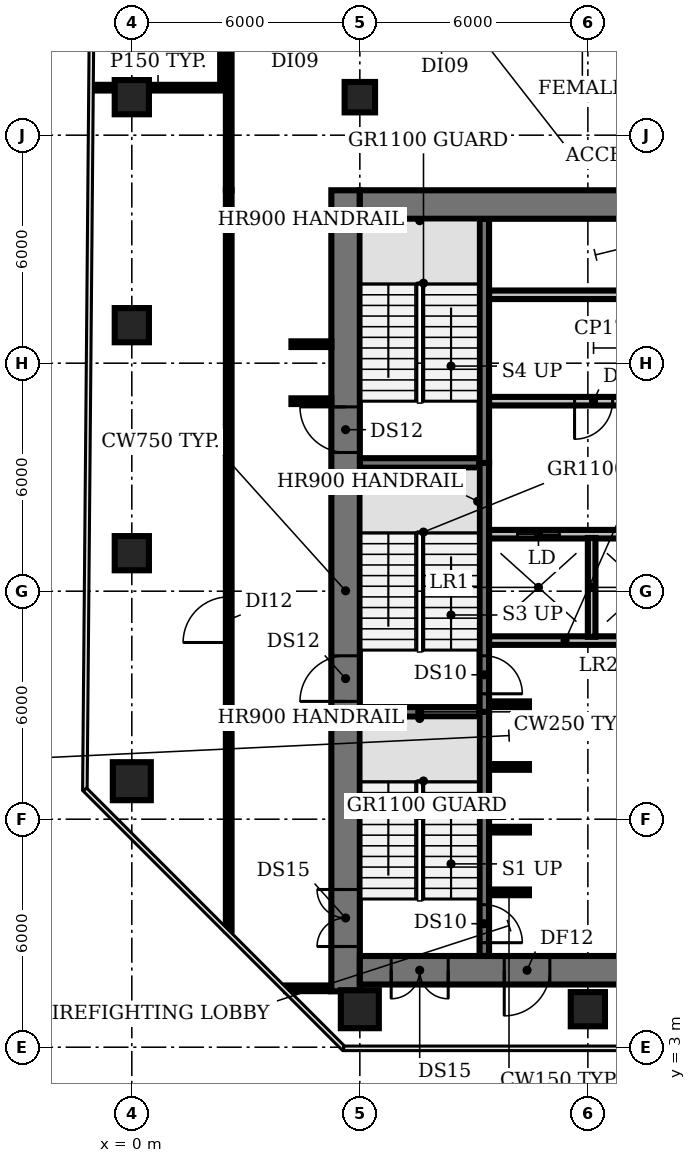
"""IFC4 building model, lengths in metres.
Left out: names, types, materials, properties, quantities, classifications, styles, units other than length and angle.
Written with IfcOpenShell. Run it as: python <this file> out.ifc"""

import sys

from ifc_helpers import new_model, si_unit, direction, frame, frame_2d, origin, origin_2d, place, context, subcontext, project, spatial, rectangle, circle, extrude, element, fill, save


model = new_model("IFC4")
c1 = context("Model", 3, precision=1e-05, world=origin(), true_north=direction((0.0, 1.0)))
c2 = subcontext(c1, "Body", "Model", "MODEL_VIEW")
j1 = project(units=[si_unit("LENGTHUNIT", "METRE"), si_unit("PLANEANGLEUNIT", "RADIAN")], contexts=[c1])
p1 = place(None, origin())
s1 = spatial("IfcSite", under=j1, at=p1, CompositionType="ELEMENT")
p2 = place(p1, origin())
s2 = spatial("IfcBuilding", under=s1, at=p2, CompositionType="ELEMENT")
p3 = place(p2, frame((0.0, 0.0, 113.0)))
s3 = spatial("IfcBuildingStorey", under=s2, at=p3, CompositionType="ELEMENT", Elevation=113.0)
p4 = place(p3, frame((0.0, 10.0, 0.0), z_axis=(0.0, 0.0, 1.0), x_axis=(1.0, 0.0, 0.0)))
e1 = element("IfcColumn", 1, at=p4, inside=s3, PredefinedType="COLUMN", context=c2, shape_type="SweptSolid", body=[
    extrude(circle(Radius=0.5, at=origin_2d()), origin(), (0.0, 0.0, 1.0), 3.85),
])
for number, where, z_axis, x_axis in (
    (2, (0.0, 16.0, 0.0), (0.0, 0.0, 1.0), (1.0, 0.0, 0.0)),
    (3, (0.0, 22.0, 0.0), (0.0, 0.0, 1.0), (1.0, 0.0, 0.0)),
    (4, (0.0, 28.0, 0.0), (0.0, 0.0, 1.0), (1.0, 0.0, 0.0)),
):
    element("IfcColumn", number, at=place(p3, frame(where, z_axis=z_axis, x_axis=x_axis)), inside=s3, PredefinedType="COLUMN", context=c2, shape_type="SweptSolid", body=[
        extrude(rectangle(XDim=0.9, YDim=0.9, at=origin_2d()), origin(), (0.0, 0.0, 1.0), 3.85),
    ])
p5 = place(p3, frame((6.0, 4.0, 0.0), z_axis=(0.0, 0.0, 1.0), x_axis=(1.0, 0.0, 0.0)))
e5 = element("IfcColumn", 5, at=p5, inside=s3, PredefinedType="COLUMN", context=c2, shape_type="SweptSolid", body=[
    extrude(circle(Radius=0.5, at=origin_2d()), origin(), (0.0, 0.0, 1.0), 3.85),
])
p6 = place(p3, frame((6.0, 28.0, 0.0), z_axis=(0.0, 0.0, 1.0), x_axis=(1.0, 0.0, 0.0)))
e6 = element("IfcColumn", 6, at=p6, inside=s3, PredefinedType="COLUMN", context=c2, shape_type="SweptSolid", body=[
    extrude(rectangle(XDim=0.8, YDim=0.8, at=origin_2d()), origin(), (0.0, 0.0, 1.0), 3.85),
])
p7 = place(p3, frame((12.0, 4.0, 0.0), z_axis=(0.0, 0.0, 1.0), x_axis=(1.0, 0.0, 0.0)))
e7 = element("IfcColumn", 7, at=p7, inside=s3, PredefinedType="COLUMN", context=c2, shape_type="SweptSolid", body=[
    extrude(rectangle(XDim=0.9, YDim=0.9, at=origin_2d()), origin(), (0.0, 0.0, 1.0), 3.85),
])
for number, where, z_axis, x_axis in (
    (8, (9.4, 7.075, 0.0), (0.0, 0.0, 1.0), (1.0, 0.0, 0.0)),
    (9, (9.4, 8.725, 0.0), (0.0, 0.0, 1.0), (1.0, 0.0, 0.0)),
    (10, (9.4, 10.375, 0.0), (0.0, 0.0, 1.0), (1.0, 0.0, 0.0)),
):
    element("IfcWall", number, at=place(p3, frame(where, z_axis=z_axis, x_axis=x_axis)), inside=s3, PredefinedType="SHEAR", context=c2, shape_type="SweptSolid", body=[
        extrude(rectangle(XDim=1.05, YDim=0.15, at=frame_2d((0.525, 0.0))), origin(), (0.0, 0.0, 1.0), 3.85),
    ])
p8 = place(p3, frame((6.0, 11.825, 0.0), z_axis=(0.0, 0.0, 1.0), x_axis=(1.0, 0.0, 0.0)))
e11 = element("IfcWall", 11, at=p8, inside=s3, PredefinedType="SHEAR", context=c2, shape_type="SweptSolid", body=[
    extrude(rectangle(XDim=3.15, YDim=0.25, at=frame_2d((1.575, 0.0))), origin(), (0.0, 0.0, 1.0), 3.85),
])
p9 = place(p3, frame((9.4, 12.025, 0.0), z_axis=(0.0, 0.0, 1.0), x_axis=(1.0, 0.0, 0.0)))
e12 = element("IfcWall", 12, at=p9, inside=s3, PredefinedType="SHEAR", context=c2, shape_type="SweptSolid", body=[
    extrude(rectangle(XDim=1.05, YDim=0.15, at=frame_2d((0.525, 0.0))), origin(), (0.0, 0.0, 1.0), 3.85),
])
p10 = place(p3, frame((9.4, 13.7, 0.0), z_axis=(0.0, 0.0, 1.0), x_axis=(1.0, 0.0, 0.0)))
e13 = element("IfcWall", 13, at=p10, inside=s3, PredefinedType="PARTITIONING", context=c2, shape_type="SweptSolid", body=[
    extrude(rectangle(XDim=4.0, YDim=0.225, at=frame_2d((2.0, 0.0))), origin(), (0.0, 0.0, 1.0), 3.85),
])
p11 = place(p3, frame((9.4, 16.5, 0.0), z_axis=(0.0, 0.0, 1.0), x_axis=(1.0, 0.0, 0.0)))
e14 = element("IfcWall", 14, at=p11, inside=s3, PredefinedType="PARTITIONING", context=c2, shape_type="SweptSolid", body=[
    extrude(rectangle(XDim=14.6, YDim=0.225, at=frame_2d((7.3, 0.0))), origin(), (0.0, 0.0, 1.0), 3.85),
])
p12 = place(p11, frame((0.75, 0.0, 0.0)))
e15 = element("IfcOpeningElement", 15, at=p12, cuts=e14, PredefinedType="OPENING", context=c2, shape_type="SweptSolid", body=[
    extrude(rectangle(XDim=1.1, YDim=2.1, at=frame_2d((0.55, 1.05))), frame((0.0, 0.123, 0.0), z_axis=(0.0, -1.0, 0.0), x_axis=(1.0, 0.0, 0.0)), (0.0, 0.0, 1.0), 0.245),
])
p13 = place(p11, frame((3.55, 0.0, 0.0)))
e16 = element("IfcOpeningElement", 16, at=p13, cuts=e14, PredefinedType="OPENING", context=c2, shape_type="SweptSolid", body=[
    extrude(rectangle(XDim=1.1, YDim=2.1, at=frame_2d((0.55, 1.05))), frame((0.0, 0.123, 0.0), z_axis=(0.0, -1.0, 0.0), x_axis=(1.0, 0.0, 0.0)), (0.0, 0.0, 1.0), 0.245),
])
p14 = place(p11, frame((6.35, 0.0, 0.0)))
e17 = element("IfcOpeningElement", 17, at=p14, cuts=e14, PredefinedType="OPENING", context=c2, shape_type="SweptSolid", body=[
    extrude(rectangle(XDim=1.1, YDim=2.1, at=frame_2d((0.55, 1.05))), frame((0.0, 0.123, 0.0), z_axis=(0.0, -1.0, 0.0), x_axis=(1.0, 0.0, 0.0)), (0.0, 0.0, 1.0), 0.245),
])
p15 = place(p11, frame((9.15, 0.0, 0.0)))
e18 = element("IfcOpeningElement", 18, at=p15, cuts=e14, PredefinedType="OPENING", context=c2, shape_type="SweptSolid", body=[
    extrude(rectangle(XDim=1.1, YDim=2.1, at=frame_2d((0.55, 1.05))), frame((0.0, 0.123, 0.0), z_axis=(0.0, -1.0, 0.0), x_axis=(1.0, 0.0, 0.0)), (0.0, 0.0, 1.0), 0.245),
])
p16 = place(p11, frame((11.308, 0.0, 0.0)))
e19 = element("IfcOpeningElement", 19, at=p16, cuts=e14, PredefinedType="OPENING", context=c2, shape_type="SweptSolid", body=[
    extrude(rectangle(XDim=0.9, YDim=2.1, at=frame_2d((0.45, 1.05))), frame((0.0, 0.123, 0.0), z_axis=(0.0, -1.0, 0.0), x_axis=(1.0, 0.0, 0.0)), (0.0, 0.0, 1.0), 0.245),
])
p17 = place(p11, frame((13.083, 0.0, 0.0)))
e20 = element("IfcOpeningElement", 20, at=p17, cuts=e14, PredefinedType="OPENING", context=c2, shape_type="SweptSolid", body=[
    extrude(rectangle(XDim=0.9, YDim=2.1, at=frame_2d((0.45, 1.05))), frame((0.0, 0.123, 0.0), z_axis=(0.0, -1.0, 0.0), x_axis=(1.0, 0.0, 0.0)), (0.0, 0.0, 1.0), 0.245),
])
p18 = place(p3, frame((6.0, 18.375, 0.0), z_axis=(0.0, 0.0, 1.0), x_axis=(1.0, 0.0, 0.0)))
e21 = element("IfcWall", 21, at=p18, inside=s3, PredefinedType="SHEAR", context=c2, shape_type="SweptSolid", body=[
    extrude(rectangle(XDim=3.15, YDim=0.25, at=frame_2d((1.575, 0.0))), origin(), (0.0, 0.0, 1.0), 3.85),
])
p19 = place(p3, frame((24.0, 20.0, 0.0), z_axis=(0.0, 0.0, 1.0), x_axis=(-1.0, 0.0, 0.0)))
e22 = element("IfcWall", 22, at=p19, inside=s3, PredefinedType="PARTITIONING", context=c2, shape_type="SweptSolid", body=[
    extrude(rectangle(XDim=14.6, YDim=0.225, at=frame_2d((7.3, 0.0))), origin(), (0.0, 0.0, 1.0), 3.85),
])
p20 = place(p19, frame((11.35, 0.0, 0.0)))
e23 = element("IfcOpeningElement", 23, at=p20, cuts=e22, PredefinedType="OPENING", context=c2, shape_type="SweptSolid", body=[
    extrude(rectangle(XDim=1.0, YDim=2.1, at=frame_2d((0.5, 1.05))), frame((0.0, 0.123, 0.0), z_axis=(0.0, -1.0, 0.0), x_axis=(1.0, 0.0, 0.0)), (0.0, 0.0, 1.0), 0.245),
])
p21 = place(p19, frame((5.775, 0.0, 0.0)))
e24 = element("IfcOpeningElement", 24, at=p21, cuts=e22, PredefinedType="OPENING", context=c2, shape_type="SweptSolid", body=[
    extrude(rectangle(XDim=1.0, YDim=2.1, at=frame_2d((0.5, 1.05))), frame((0.0, 0.123, 0.0), z_axis=(0.0, -1.0, 0.0), x_axis=(1.0, 0.0, 0.0)), (0.0, 0.0, 1.0), 0.245),
])
p22 = place(p19, frame((2.308, 0.0, 0.0)))
e25 = element("IfcOpeningElement", 25, at=p22, cuts=e22, PredefinedType="OPENING", context=c2, shape_type="SweptSolid", body=[
    extrude(rectangle(XDim=0.9, YDim=2.1, at=frame_2d((0.45, 1.05))), frame((0.0, 0.123, 0.0), z_axis=(0.0, -1.0, 0.0), x_axis=(1.0, 0.0, 0.0)), (0.0, 0.0, 1.0), 0.245),
])
p23 = place(p19, frame((0.532, 0.0, 0.0)))
e26 = element("IfcOpeningElement", 26, at=p23, cuts=e22, PredefinedType="OPENING", context=c2, shape_type="SweptSolid", body=[
    extrude(rectangle(XDim=0.9, YDim=2.1, at=frame_2d((0.45, 1.05))), frame((0.0, 0.123, 0.0), z_axis=(0.0, -1.0, 0.0), x_axis=(1.0, 0.0, 0.0)), (0.0, 0.0, 1.0), 0.245),
])
p24 = place(p3, frame((9.4, 22.8, 0.0), z_axis=(0.0, 0.0, 1.0), x_axis=(1.0, 0.0, 0.0)))
e27 = element("IfcWall", 27, at=p24, inside=s3, PredefinedType="PARTITIONING", context=c2, shape_type="SweptSolid", body=[
    extrude(rectangle(XDim=14.6, YDim=0.225, at=frame_2d((7.3, 0.0))), origin(), (0.0, 0.0, 1.0), 3.85),
])
p25 = place(p3, frame((9.275, 11.825, 0.0), z_axis=(0.0, 0.0, 1.0), x_axis=(0.0, -1.0, 0.0)))
e28 = element("IfcWall", 28, at=p25, inside=s3, PredefinedType="SHEAR", context=c2, shape_type="SweptSolid", body=[
    extrude(rectangle(XDim=6.425, YDim=0.25, at=frame_2d((3.212, 0.0))), origin(), (0.0, 0.0, 1.0), 3.85),
])
p26 = place(p25, frame((5.075, 0.0, 0.0)))
e29 = element("IfcOpeningElement", 29, at=p26, cuts=e28, PredefinedType="OPENING", context=c2, shape_type="SweptSolid", body=[
    extrude(rectangle(XDim=1.0, YDim=2.1, at=frame_2d((0.5, 1.05))), frame((0.0, 0.135, 0.0), z_axis=(0.0, -1.0, 0.0), x_axis=(1.0, 0.0, 0.0)), (0.0, 0.0, 1.0), 0.27),
])
p27 = place(p3, frame((9.275, 18.375, 0.0), z_axis=(0.0, 0.0, 1.0), x_axis=(0.0, -1.0, 0.0)))
e30 = element("IfcWall", 30, at=p27, inside=s3, PredefinedType="SHEAR", context=c2, shape_type="SweptSolid", body=[
    extrude(rectangle(XDim=6.55, YDim=0.25, at=frame_2d((3.275, 0.0))), origin(), (0.0, 0.0, 1.0), 3.85),
])
p28 = place(p27, frame((5.075, 0.0, 0.0)))
e31 = element("IfcOpeningElement", 31, at=p28, cuts=e30, PredefinedType="OPENING", context=c2, shape_type="SweptSolid", body=[
    extrude(rectangle(XDim=1.0, YDim=2.1, at=frame_2d((0.5, 1.05))), frame((0.0, 0.135, 0.0), z_axis=(0.0, -1.0, 0.0), x_axis=(1.0, 0.0, 0.0)), (0.0, 0.0, 1.0), 0.27),
])
p29 = place(p3, frame((9.275, 18.375, 0.0), z_axis=(0.0, 0.0, 1.0), x_axis=(0.0, 1.0, 0.0)))
e32 = element("IfcWall", 32, at=p29, inside=s3, PredefinedType="SHEAR", context=c2, shape_type="SweptSolid", body=[
    extrude(rectangle(XDim=6.425, YDim=0.25, at=frame_2d((3.212, 0.0))), origin(), (0.0, 0.0, 1.0), 3.85),
])
p30 = place(p3, frame((12.1, 13.8, 0.0), z_axis=(0.0, 0.0, 1.0), x_axis=(0.0, 1.0, 0.0)))
e33 = element("IfcWall", 33, at=p30, inside=s3, PredefinedType="SOLIDWALL", context=c2, shape_type="SweptSolid", body=[
    extrude(rectangle(XDim=2.6, YDim=0.2, at=frame_2d((1.3, 0.0))), origin(), (0.0, 0.0, 1.0), 3.85),
])
p31 = place(p3, frame((5.625, 4.47, 0.0), z_axis=(0.0, 0.0, 1.0), x_axis=(0.0, 1.0, 0.0)))
e34 = element("IfcWall", 34, at=p31, inside=s3, PredefinedType="SHEAR", context=c2, shape_type="SweptSolid", body=[
    extrude(rectangle(XDim=21.08, YDim=0.75, at=frame_2d((10.54, 0.0))), origin(), (0.0, 0.0, 1.0), 3.85),
])
p32 = place(p31, frame((1.18, 0.0, 0.0)))
e35 = element("IfcOpeningElement", 35, at=p32, cuts=e34, PredefinedType="OPENING", context=c2, shape_type="SweptSolid", body=[
    extrude(rectangle(XDim=1.5, YDim=2.1, at=frame_2d((0.75, 1.05))), frame((0.0, 0.385, 0.0), z_axis=(0.0, -1.0, 0.0), x_axis=(1.0, 0.0, 0.0)), (0.0, 0.0, 1.0), 0.77),
])
p33 = place(p31, frame((7.63, 0.0, 0.0)))
e36 = element("IfcOpeningElement", 36, at=p33, cuts=e34, PredefinedType="OPENING", context=c2, shape_type="SweptSolid", body=[
    extrude(rectangle(XDim=1.2, YDim=2.1, at=frame_2d((0.6, 1.05))), frame((0.0, 0.385, 0.0), z_axis=(0.0, -1.0, 0.0), x_axis=(1.0, 0.0, 0.0)), (0.0, 0.0, 1.0), 0.77),
])
p34 = place(p31, frame((14.18, 0.0, 0.0)))
e37 = element("IfcOpeningElement", 37, at=p34, cuts=e34, PredefinedType="OPENING", context=c2, shape_type="SweptSolid", body=[
    extrude(rectangle(XDim=1.2, YDim=2.1, at=frame_2d((0.6, 1.05))), frame((0.0, 0.385, 0.0), z_axis=(0.0, -1.0, 0.0), x_axis=(1.0, 0.0, 0.0)), (0.0, 0.0, 1.0), 0.77),
])
p35 = place(p3, frame((24.0, 5.025, 0.0), z_axis=(0.0, 0.0, 1.0), x_axis=(-1.0, 0.0, 0.0)))
e38 = element("IfcWall", 38, at=p35, inside=s3, PredefinedType="SHEAR", context=c2, shape_type="SweptSolid", body=[
    extrude(rectangle(XDim=18.0, YDim=0.75, at=frame_2d((9.0, 0.0))), origin(), (0.0, 0.0, 1.0), 3.85),
])
p36 = place(p35, frame((0.825, 0.0, 0.0)))
e39 = element("IfcOpeningElement", 39, at=p36, cuts=e38, PredefinedType="OPENING", context=c2, shape_type="SweptSolid", body=[
    extrude(rectangle(XDim=1.5, YDim=2.1, at=frame_2d((0.75, 1.05))), frame((0.0, 0.385, 0.0), z_axis=(0.0, -1.0, 0.0), x_axis=(1.0, 0.0, 0.0)), (0.0, 0.0, 1.0), 0.77),
])
p37 = place(p35, frame((15.675, 0.0, 0.0)))
e40 = element("IfcOpeningElement", 40, at=p37, cuts=e38, PredefinedType="OPENING", context=c2, shape_type="SweptSolid", body=[
    extrude(rectangle(XDim=1.5, YDim=2.1, at=frame_2d((0.75, 1.05))), frame((0.0, 0.385, 0.0), z_axis=(0.0, -1.0, 0.0), x_axis=(1.0, 0.0, 0.0)), (0.0, 0.0, 1.0), 0.77),
])
p38 = place(p35, frame((13.0, 0.0, 0.0)))
e41 = element("IfcOpeningElement", 41, at=p38, cuts=e38, PredefinedType="OPENING", context=c2, shape_type="SweptSolid", body=[
    extrude(rectangle(XDim=1.2, YDim=2.1, at=frame_2d((0.6, 1.05))), frame((0.0, 0.385, 0.0), z_axis=(0.0, -1.0, 0.0), x_axis=(1.0, 0.0, 0.0)), (0.0, 0.0, 1.0), 0.77),
])
p39 = place(p35, frame((4.35, 0.0, 0.0)))
e42 = element("IfcOpeningElement", 42, at=p39, cuts=e38, PredefinedType="OPENING", context=c2, shape_type="SweptSolid", body=[
    extrude(rectangle(XDim=1.0, YDim=2.1, at=frame_2d((0.5, 1.05))), frame((0.0, 0.385, 0.0), z_axis=(0.0, -1.0, 0.0), x_axis=(1.0, 0.0, 0.0)), (0.0, 0.0, 1.0), 0.77),
])
p40 = place(p3, frame((6.0, 25.175, 0.0), z_axis=(0.0, 0.0, 1.0), x_axis=(1.0, 0.0, 0.0)))
e43 = element("IfcWall", 43, at=p40, inside=s3, PredefinedType="SHEAR", context=c2, shape_type="SweptSolid", body=[
    extrude(rectangle(XDim=18.0, YDim=0.75, at=frame_2d((9.0, 0.0))), origin(), (0.0, 0.0, 1.0), 3.85),
])
p41 = place(p3, frame((-1.02, 28.25, 0.0), z_axis=(0.0, 0.0, 1.0), x_axis=(1.0, 0.0, 0.0)))
e44 = element("IfcWall", 44, at=p41, inside=s3, PredefinedType="PARTITIONING", context=c2, shape_type="SweptSolid", body=[
    extrude(rectangle(XDim=3.42, YDim=0.15, at=frame_2d((1.71, 0.0))), origin(), (0.0, 0.0, 1.0), 2.83),
])
p42 = place(p3, frame((2.4, 28.25, 0.0), z_axis=(0.0, 0.0, 1.0), x_axis=(0.0, 1.0, 0.0)))
e45 = element("IfcWall", 45, at=p42, inside=s3, PredefinedType="PARTITIONING", context=c2, shape_type="SweptSolid", body=[
    extrude(rectangle(XDim=6.0, YDim=0.15, at=frame_2d((3.0, 0.0))), origin(), (0.0, 0.0, 1.0), 2.83),
])
p43 = place(p3, frame((2.55, 6.07, 0.0), z_axis=(0.0, 0.0, 1.0), x_axis=(0.0, 1.0, 0.0)))
e46 = element("IfcWall", 46, at=p43, inside=s3, PredefinedType="PARTITIONING", context=c2, shape_type="SweptSolid", body=[
    extrude(rectangle(XDim=19.48, YDim=0.15, at=frame_2d((9.74, 0.0))), origin(), (0.0, 0.0, 1.0), 2.83),
])
p44 = place(p43, frame((7.58, 0.0, 0.0)))
e47 = element("IfcOpeningElement", 47, at=p44, cuts=e46, PredefinedType="OPENING", context=c2, shape_type="SweptSolid", body=[
    extrude(rectangle(XDim=1.2, YDim=2.1, at=frame_2d((0.6, 1.05))), frame((0.0, 0.085, 0.0), z_axis=(0.0, -1.0, 0.0), x_axis=(1.0, 0.0, 0.0)), (0.0, 0.0, 1.0), 0.17),
])
p45 = place(p3, frame((2.55, 25.55, 0.0), z_axis=(0.0, 0.0, 1.0), x_axis=(0.0, 1.0, 0.0)))
e48 = element("IfcWall", 48, at=p45, inside=s3, PredefinedType="PARTITIONING", context=c2, shape_type="SweptSolid", body=[
    extrude(rectangle(XDim=3.9, YDim=0.15, at=frame_2d((1.95, 0.0))), origin(), (0.0, 0.0, 1.0), 2.83),
])
p46 = place(p3, frame((4.06, 4.55, 0.0), z_axis=(0.0, 0.0, 1.0), x_axis=(1.0, 0.0, 0.0)))
e49 = element("IfcWall", 49, at=p46, inside=s3, PredefinedType="PARTITIONING", context=c2, shape_type="SweptSolid", body=[
    extrude(rectangle(XDim=1.09, YDim=0.15, at=frame_2d((0.545, 0.0))), origin(), (0.0, 0.0, 1.0), 2.83),
])
for number, where, z_axis, x_axis in (
    (50, (4.2, 20.0, 0.0), (0.0, 0.0, 1.0), (1.0, 0.0, 0.0)),
    (51, (4.2, 21.5, 0.0), (0.0, 0.0, 1.0), (1.0, 0.0, 0.0)),
):
    element("IfcWall", number, at=place(p3, frame(where, z_axis=z_axis, x_axis=x_axis)), inside=s3, PredefinedType="PARTITIONING", context=c2, shape_type="SweptSolid", body=[
        extrude(rectangle(XDim=1.05, YDim=0.15, at=frame_2d((0.525, 0.0))), origin(), (0.0, 0.0, 1.0), 2.83),
    ])
p47 = place(p12, origin())
e52 = element("IfcDoor", 52, at=p47, inside=s3, OperationType="DOUBLE_DOOR_SLIDING", PredefinedType="DOOR", context=c2, shape_type="SweptSolid", body=[
    extrude(rectangle(XDim=1.1, YDim=2.1, at=frame_2d((0.55, 1.05))), frame((0.0, 0.025, 0.0), z_axis=(0.0, -1.0, 0.0), x_axis=(1.0, 0.0, 0.0)), (0.0, 0.0, 1.0), 0.05),
])
fill(e15, e52)
p48 = place(p20, origin())
e53 = element("IfcDoor", 53, at=p48, inside=s3, OperationType="SINGLE_SWING_RIGHT", PredefinedType="DOOR", context=c2, shape_type="SweptSolid", body=[
    extrude(rectangle(XDim=1.0, YDim=2.1, at=frame_2d((0.5, 1.05))), frame((0.0, 0.025, 0.0), z_axis=(0.0, -1.0, 0.0), x_axis=(1.0, 0.0, 0.0)), (0.0, 0.0, 1.0), 0.05),
])
fill(e23, e53)
p49 = place(p26, origin())
e54 = element("IfcDoor", 54, at=p49, inside=s3, OperationType="SINGLE_SWING_RIGHT", PredefinedType="DOOR", context=c2, shape_type="SweptSolid", body=[
    extrude(rectangle(XDim=1.0, YDim=2.1, at=frame_2d((0.5, 1.05))), frame((0.0, 0.025, 0.0), z_axis=(0.0, -1.0, 0.0), x_axis=(1.0, 0.0, 0.0)), (0.0, 0.0, 1.0), 0.05),
])
fill(e29, e54)
p50 = place(p28, origin())
e55 = element("IfcDoor", 55, at=p50, inside=s3, OperationType="SINGLE_SWING_RIGHT", PredefinedType="DOOR", context=c2, shape_type="SweptSolid", body=[
    extrude(rectangle(XDim=1.0, YDim=2.1, at=frame_2d((0.5, 1.05))), frame((0.0, 0.025, 0.0), z_axis=(0.0, -1.0, 0.0), x_axis=(1.0, 0.0, 0.0)), (0.0, 0.0, 1.0), 0.05),
])
fill(e31, e55)
p51 = place(p32, origin())
e56 = element("IfcDoor", 56, at=p51, inside=s3, OperationType="DOUBLE_DOOR_SINGLE_SWING", PredefinedType="DOOR", context=c2, shape_type="SweptSolid", body=[
    extrude(rectangle(XDim=1.5, YDim=2.1, at=frame_2d((0.75, 1.05))), frame((0.0, 0.025, 0.0), z_axis=(0.0, -1.0, 0.0), x_axis=(1.0, 0.0, 0.0)), (0.0, 0.0, 1.0), 0.05),
])
fill(e35, e56)
p52 = place(p33, origin())
e57 = element("IfcDoor", 57, at=p52, inside=s3, OperationType="SINGLE_SWING_LEFT", PredefinedType="DOOR", context=c2, shape_type="SweptSolid", body=[
    extrude(rectangle(XDim=1.2, YDim=2.1, at=frame_2d((0.6, 1.05))), frame((0.0, 0.025, 0.0), z_axis=(0.0, -1.0, 0.0), x_axis=(1.0, 0.0, 0.0)), (0.0, 0.0, 1.0), 0.05),
])
fill(e36, e57)
p53 = place(p34, origin())
e58 = element("IfcDoor", 58, at=p53, inside=s3, OperationType="SINGLE_SWING_RIGHT", PredefinedType="DOOR", context=c2, shape_type="SweptSolid", body=[
    extrude(rectangle(XDim=1.2, YDim=2.1, at=frame_2d((0.6, 1.05))), frame((0.0, 0.025, 0.0), z_axis=(0.0, -1.0, 0.0), x_axis=(1.0, 0.0, 0.0)), (0.0, 0.0, 1.0), 0.05),
])
fill(e37, e58)
p54 = place(p37, origin())
e59 = element("IfcDoor", 59, at=p54, inside=s3, OperationType="DOUBLE_DOOR_SINGLE_SWING", PredefinedType="DOOR", context=c2, shape_type="SweptSolid", body=[
    extrude(rectangle(XDim=1.5, YDim=2.1, at=frame_2d((0.75, 1.05))), frame((0.0, 0.025, 0.0), z_axis=(0.0, -1.0, 0.0), x_axis=(1.0, 0.0, 0.0)), (0.0, 0.0, 1.0), 0.05),
])
fill(e40, e59)
p55 = place(p38, origin())
e60 = element("IfcDoor", 60, at=p55, inside=s3, OperationType="SINGLE_SWING_RIGHT", PredefinedType="DOOR", context=c2, shape_type="SweptSolid", body=[
    extrude(rectangle(XDim=1.2, YDim=2.1, at=frame_2d((0.6, 1.05))), frame((0.0, 0.025, 0.0), z_axis=(0.0, -1.0, 0.0), x_axis=(1.0, 0.0, 0.0)), (0.0, 0.0, 1.0), 0.05),
])
fill(e41, e60)
p56 = place(p44, origin())
e61 = element("IfcDoor", 61, at=p56, inside=s3, OperationType="SINGLE_SWING_LEFT", PredefinedType="DOOR", context=c2, shape_type="SweptSolid", body=[
    extrude(rectangle(XDim=1.2, YDim=2.1, at=frame_2d((0.6, 1.05))), frame((0.0, 0.025, 0.0), z_axis=(0.0, -1.0, 0.0), x_axis=(1.0, 0.0, 0.0)), (0.0, 0.0, 1.0), 0.05),
])
fill(e47, e61)
save(model, sys.argv[1])
